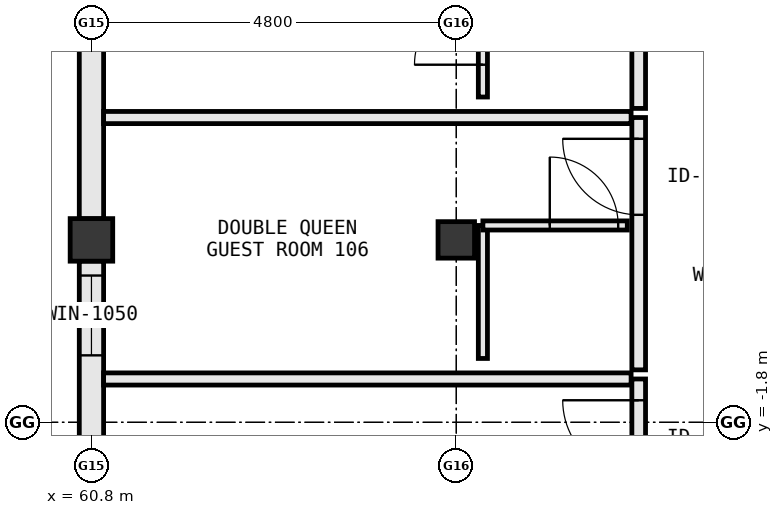
"""IFC4 building model, lengths in metres.
Left out: names, types, materials, properties, quantities, classifications, styles, units other than length and angle.
Written with IfcOpenShell. Run it as: python <this file> out.ifc"""

import sys

from ifc_helpers import new_model, si_unit, direction, frame, frame_2d, origin, origin_2d, place, context, subcontext, project, spatial, rectangle, extrude, element, fill, save


model = new_model("IFC4")
c1 = context("Model", 3, precision=1e-05, world=origin(), true_north=direction((0.0, 1.0)))
c2 = subcontext(c1, "Body", "Model", "MODEL_VIEW")
j1 = project(units=[si_unit("LENGTHUNIT", "METRE"), si_unit("PLANEANGLEUNIT", "RADIAN")], contexts=[c1])
p1 = place(None, origin())
s1 = spatial("IfcSite", under=j1, at=p1, CompositionType="ELEMENT")
p2 = place(p1, origin())
s2 = spatial("IfcBuilding", under=s1, at=p2, CompositionType="ELEMENT")
p3 = place(p2, frame((0.0, 0.0, 20.0)))
s3 = spatial("IfcBuildingStorey", under=s2, at=p3, CompositionType="ELEMENT", Elevation=20.0)
p4 = place(p3, frame((60.8, 0.6, 0.0), z_axis=(0.0, 0.0, 1.0), x_axis=(1.0, 0.0, 0.0)))
e1 = element("IfcColumn", 1, at=p4, inside=s3, PredefinedType="COLUMN", context=c2, shape_type="SweptSolid", body=[
    extrude(rectangle(XDim=0.56, YDim=0.56, at=origin_2d()), origin(), (0.0, 0.0, 1.0), 3.8),
])
p5 = place(p3, frame((65.6, 0.6, 0.0), z_axis=(0.0, 0.0, 1.0), x_axis=(1.0, 0.0, 0.0)))
e2 = element("IfcColumn", 2, at=p5, inside=s3, PredefinedType="COLUMN", context=c2, shape_type="SweptSolid", body=[
    extrude(rectangle(XDim=0.48, YDim=0.48, at=origin_2d()), origin(), (0.0, 0.0, 1.0), 3.8),
])
p6 = place(p3, frame((60.8, 9.922, 0.0), z_axis=(0.0, 0.0, 1.0), x_axis=(0.0, -1.0, 0.0)))
e3 = element("IfcWall", 3, at=p6, inside=s3, PredefinedType="STANDARD", context=c2, shape_type="SweptSolid", body=[
    extrude(rectangle(XDim=9.044, YDim=0.32, at=frame_2d((4.522, 0.0))), origin(), (0.0, 0.0, 1.0), 2.905),
])
p7 = place(p6, frame((5.032, 0.0, 0.85)))
e4 = element("IfcOpeningElement", 4, at=p7, cuts=e3, PredefinedType="OPENING", context=c2, shape_type="SweptSolid", body=[
    extrude(rectangle(XDim=1.8, YDim=1.85, at=frame_2d((0.9, 0.925))), frame((0.0, 0.172, 0.0), z_axis=(0.0, -1.0, 0.0), x_axis=(1.0, 0.0, 0.0)), (0.0, 0.0, 1.0), 0.344),
])
p8 = place(p6, frame((1.592, 0.0, 0.85)))
e5 = element("IfcOpeningElement", 5, at=p8, cuts=e3, PredefinedType="OPENING", context=c2, shape_type="SweptSolid", body=[
    extrude(rectangle(XDim=1.8, YDim=1.85, at=frame_2d((0.9, 0.925))), frame((0.0, 0.172, 0.0), z_axis=(0.0, -1.0, 0.0), x_axis=(1.0, 0.0, 0.0)), (0.0, 0.0, 1.0), 0.344),
])
p9 = place(p3, frame((60.8, 0.322, 0.0), z_axis=(0.0, 0.0, 1.0), x_axis=(0.0, -1.0, 0.0)))
e6 = element("IfcWall", 6, at=p9, inside=s3, PredefinedType="STANDARD", context=c2, shape_type="SweptSolid", body=[
    extrude(rectangle(XDim=9.044, YDim=0.32, at=frame_2d((4.522, 0.0))), origin(), (0.0, 0.0, 1.0), 2.905),
])
p10 = place(p9, frame((5.883, 0.0, 0.85)))
e7 = element("IfcOpeningElement", 7, at=p10, cuts=e6, PredefinedType="OPENING", context=c2, shape_type="SweptSolid", body=[
    extrude(rectangle(XDim=1.8, YDim=1.85, at=frame_2d((0.9, 0.925))), frame((0.0, 0.172, 0.0), z_axis=(0.0, -1.0, 0.0), x_axis=(1.0, 0.0, 0.0)), (0.0, 0.0, 1.0), 0.344),
])
p11 = place(p9, frame((2.312, 0.0, 0.85)))
e8 = element("IfcOpeningElement", 8, at=p11, cuts=e6, PredefinedType="OPENING", context=c2, shape_type="SweptSolid", body=[
    extrude(rectangle(XDim=1.8, YDim=1.85, at=frame_2d((0.9, 0.925))), frame((0.0, 0.172, 0.0), z_axis=(0.0, -1.0, 0.0), x_axis=(1.0, 0.0, 0.0)), (0.0, 0.0, 1.0), 0.344),
])
p12 = place(p9, frame((0.191, 0.0, 0.85)))
e9 = element("IfcOpeningElement", 9, at=p12, cuts=e6, PredefinedType="OPENING", context=c2, shape_type="SweptSolid", body=[
    extrude(rectangle(XDim=1.05, YDim=1.45, at=frame_2d((0.525, 0.725))), frame((0.0, 0.172, 0.0), z_axis=(0.0, -1.0, 0.0), x_axis=(1.0, 0.0, 0.0)), (0.0, 0.0, 1.0), 0.344),
])
p13 = place(p3, frame((68.0, -4.55, 0.0), z_axis=(0.0, 0.0, 1.0), x_axis=(0.0, 1.0, 0.0)))
e10 = element("IfcWall", 10, at=p13, inside=s3, PredefinedType="PARTITIONING", context=c2, shape_type="SweptSolid", body=[
    extrude(rectangle(XDim=3.32, YDim=0.18, at=frame_2d((1.66, 0.0))), origin(), (0.0, 0.0, 1.0), 3.55),
])
p14 = place(p13, frame((2.04, 0.0, 0.0)))
e11 = element("IfcOpeningElement", 11, at=p14, cuts=e10, PredefinedType="OPENING", context=c2, shape_type="SweptSolid", body=[
    extrude(rectangle(XDim=1.0, YDim=2.2, at=frame_2d((0.5, 1.1))), frame((0.0, 0.102, 0.0), z_axis=(0.0, -1.0, 0.0), x_axis=(1.0, 0.0, 0.0)), (0.0, 0.0, 1.0), 0.204),
])
p15 = place(p3, frame((60.96, -1.23, 0.0), z_axis=(0.0, 0.0, 1.0), x_axis=(1.0, 0.0, 0.0)))
e12 = element("IfcWall", 12, at=p15, inside=s3, PredefinedType="PARTITIONING", context=c2, shape_type="SweptSolid", body=[
    extrude(rectangle(XDim=6.94, YDim=0.16, at=frame_2d((3.47, 0.0))), origin(), (0.0, 0.0, 1.0), 3.55),
])
p16 = place(p3, frame((68.0, -1.11, 0.0), z_axis=(0.0, 0.0, 1.0), x_axis=(0.0, 1.0, 0.0)))
e13 = element("IfcWall", 13, at=p16, inside=s3, PredefinedType="PARTITIONING", context=c2, shape_type="SweptSolid", body=[
    extrude(rectangle(XDim=3.32, YDim=0.18, at=frame_2d((1.66, 0.0))), origin(), (0.0, 0.0, 1.0), 3.55),
])
p17 = place(p16, frame((2.04, 0.0, 0.0)))
e14 = element("IfcOpeningElement", 14, at=p17, cuts=e13, PredefinedType="OPENING", context=c2, shape_type="SweptSolid", body=[
    extrude(rectangle(XDim=1.0, YDim=2.2, at=frame_2d((0.5, 1.1))), frame((0.0, 0.102, 0.0), z_axis=(0.0, -1.0, 0.0), x_axis=(1.0, 0.0, 0.0)), (0.0, 0.0, 1.0), 0.204),
])
p18 = place(p3, frame((60.96, 2.21, 0.0), z_axis=(0.0, 0.0, 1.0), x_axis=(1.0, 0.0, 0.0)))
e15 = element("IfcWall", 15, at=p18, inside=s3, PredefinedType="PARTITIONING", context=c2, shape_type="SweptSolid", body=[
    extrude(rectangle(XDim=6.94, YDim=0.16, at=frame_2d((3.47, 0.0))), origin(), (0.0, 0.0, 1.0), 3.55),
])
p19 = place(p3, frame((65.95, -0.96, 0.0), z_axis=(0.0, 0.0, 1.0), x_axis=(0.0, 1.0, 0.0)))
e16 = element("IfcWall", 16, at=p19, inside=s3, PredefinedType="PARTITIONING", context=c2, shape_type="SweptSolid", body=[
    extrude(rectangle(XDim=1.75, YDim=0.12, at=frame_2d((0.875, 0.0))), origin(), (0.0, 0.0, 1.0), 2.905),
])
p20 = place(p3, frame((65.95, 0.79, 0.0), z_axis=(0.0, 0.0, 1.0), x_axis=(1.0, 0.0, 0.0)))
e17 = element("IfcWall", 17, at=p20, inside=s3, PredefinedType="PARTITIONING", context=c2, shape_type="SweptSolid", body=[
    extrude(rectangle(XDim=1.9, YDim=0.12, at=frame_2d((0.95, 0.0))), origin(), (0.0, 0.0, 1.0), 2.905),
])
p21 = place(p20, frame((0.88, 0.0, 0.0)))
e18 = element("IfcOpeningElement", 18, at=p21, cuts=e17, PredefinedType="OPENING", context=c2, shape_type="SweptSolid", body=[
    extrude(rectangle(XDim=0.9, YDim=2.15, at=frame_2d((0.45, 1.075))), frame((0.0, 0.072, 0.0), z_axis=(0.0, -1.0, 0.0), x_axis=(1.0, 0.0, 0.0)), (0.0, 0.0, 1.0), 0.144),
])
p22 = place(p3, frame((68.0, 2.33, 0.0), z_axis=(0.0, 0.0, 1.0), x_axis=(0.0, 1.0, 0.0)))
e19 = element("IfcWall", 19, at=p22, inside=s3, PredefinedType="PARTITIONING", context=c2, shape_type="SweptSolid", body=[
    extrude(rectangle(XDim=3.32, YDim=0.18, at=frame_2d((1.66, 0.0))), origin(), (0.0, 0.0, 1.0), 3.55),
])
p23 = place(p22, frame((2.04, 0.0, 0.0)))
e20 = element("IfcOpeningElement", 20, at=p23, cuts=e19, PredefinedType="OPENING", context=c2, shape_type="SweptSolid", body=[
    extrude(rectangle(XDim=1.0, YDim=2.2, at=frame_2d((0.5, 1.1))), frame((0.0, 0.102, 0.0), z_axis=(0.0, -1.0, 0.0), x_axis=(1.0, 0.0, 0.0)), (0.0, 0.0, 1.0), 0.204),
])
p24 = place(p3, frame((65.95, 2.48, 0.0), z_axis=(0.0, 0.0, 1.0), x_axis=(0.0, 1.0, 0.0)))
e21 = element("IfcWall", 21, at=p24, inside=s3, PredefinedType="PARTITIONING", context=c2, shape_type="SweptSolid", body=[
    extrude(rectangle(XDim=1.75, YDim=0.12, at=frame_2d((0.875, 0.0))), origin(), (0.0, 0.0, 1.0), 2.905),
])
p25 = place(p24, frame((0.425, 0.0, 0.0)))
e22 = element("IfcOpeningElement", 22, at=p25, cuts=e21, PredefinedType="OPENING", context=c2, shape_type="SweptSolid", body=[
    extrude(rectangle(XDim=0.9, YDim=2.15, at=frame_2d((0.45, 1.075))), frame((0.0, 0.072, 0.0), z_axis=(0.0, -1.0, 0.0), x_axis=(1.0, 0.0, 0.0)), (0.0, 0.0, 1.0), 0.144),
])
p26 = place(p12, origin())
e23 = element("IfcWindow", 23, at=p26, inside=s3, PartitioningType="SINGLE_PANEL", PredefinedType="WINDOW", context=c2, shape_type="SweptSolid", body=[
    extrude(rectangle(XDim=1.05, YDim=1.45, at=frame_2d((0.525, 0.725))), frame((0.0, 0.03, 0.0), z_axis=(0.0, -1.0, 0.0), x_axis=(1.0, 0.0, 0.0)), (0.0, 0.0, 1.0), 0.06),
])
fill(e9, e23)
p27 = place(p14, origin())
e24 = element("IfcDoor", 24, at=p27, inside=s3, OperationType="SINGLE_SWING_RIGHT", PredefinedType="DOOR", context=c2, shape_type="SweptSolid", body=[
    extrude(rectangle(XDim=1.0, YDim=2.2, at=frame_2d((0.5, 1.1))), frame((0.0, 0.025, 0.0), z_axis=(0.0, -1.0, 0.0), x_axis=(1.0, 0.0, 0.0)), (0.0, 0.0, 1.0), 0.05),
])
fill(e11, e24)
p28 = place(p17, origin())
e25 = element("IfcDoor", 25, at=p28, inside=s3, OperationType="SINGLE_SWING_RIGHT", PredefinedType="DOOR", context=c2, shape_type="SweptSolid", body=[
    extrude(rectangle(XDim=1.0, YDim=2.2, at=frame_2d((0.5, 1.1))), frame((0.0, 0.025, 0.0), z_axis=(0.0, -1.0, 0.0), x_axis=(1.0, 0.0, 0.0)), (0.0, 0.0, 1.0), 0.05),
])
fill(e14, e25)
p29 = place(p21, origin())
e26 = element("IfcDoor", 26, at=p29, inside=s3, OperationType="SINGLE_SWING_LEFT", PredefinedType="DOOR", context=c2, shape_type="SweptSolid", body=[
    extrude(rectangle(XDim=0.9, YDim=2.15, at=frame_2d((0.45, 1.075))), frame((0.0, 0.025, 0.0), z_axis=(0.0, -1.0, 0.0), x_axis=(1.0, 0.0, 0.0)), (0.0, 0.0, 1.0), 0.05),
])
fill(e18, e26)
p30 = place(p25, origin())
e27 = element("IfcDoor", 27, at=p30, inside=s3, OperationType="SINGLE_SWING_LEFT", PredefinedType="DOOR", context=c2, shape_type="SweptSolid", body=[
    extrude(rectangle(XDim=0.9, YDim=2.15, at=frame_2d((0.45, 1.075))), frame((0.0, 0.025, 0.0), z_axis=(0.0, -1.0, 0.0), x_axis=(1.0, 0.0, 0.0)), (0.0, 0.0, 1.0), 0.05),
])
fill(e22, e27)
save(model, sys.argv[1])
